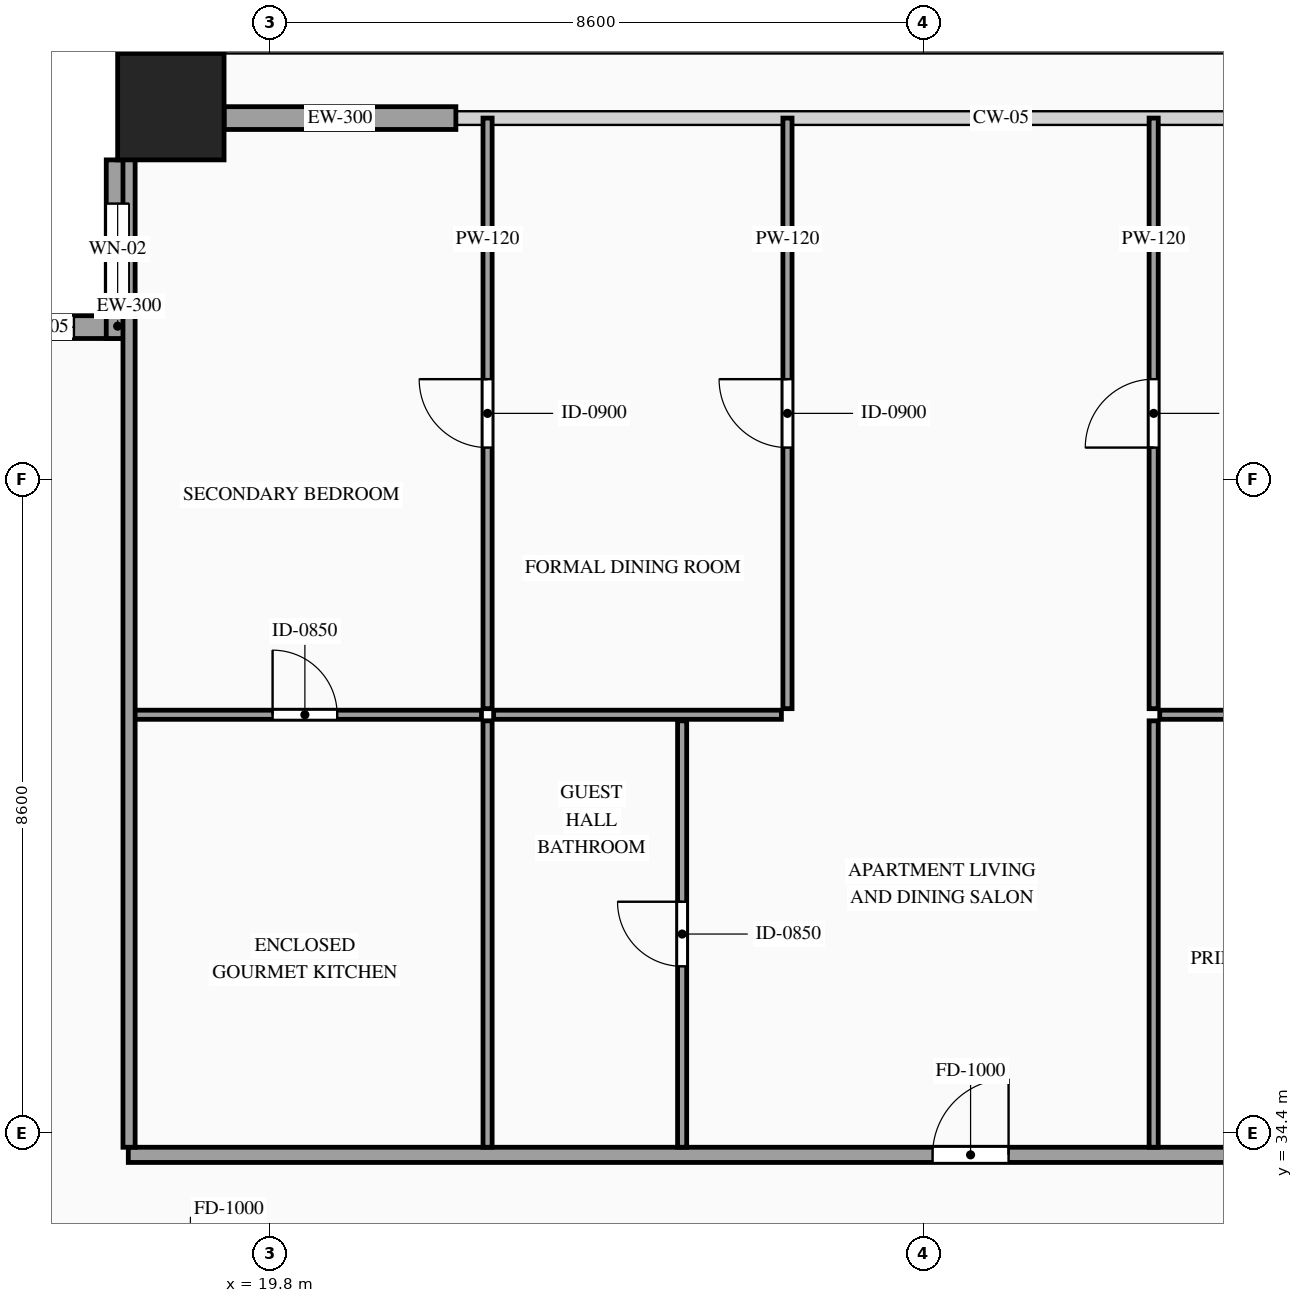
"""IFC4 building model, lengths in metres.
Left out: names, types, materials, properties, quantities, classifications, styles, units other than length and angle.
Written with IfcOpenShell. Run it as: python <this file> out.ifc"""

import sys

from ifc_helpers import new_model, si_unit, direction, frame, frame_2d, origin, origin_2d, place, context, subcontext, project, spatial, rectangle, hollow_rectangle, extrude, source, transform, mapped, element, fill, save


model = new_model("IFC4")
c1 = context("Model", 3, precision=1e-05, world=origin(), true_north=direction((0.0, 1.0)))
c2 = subcontext(c1, "Body", "Model", "MODEL_VIEW")
j1 = project(units=[si_unit("LENGTHUNIT", "METRE"), si_unit("PLANEANGLEUNIT", "RADIAN")], contexts=[c1])
p1 = place(None, origin())
s1 = spatial("IfcSite", under=j1, at=p1, CompositionType="ELEMENT")
p2 = place(p1, origin())
s2 = spatial("IfcBuilding", under=s1, at=p2, CompositionType="ELEMENT")
p3 = place(p2, frame((0.0, 0.0, 212.5)))
s3 = spatial("IfcBuildingStorey", under=s2, at=p3, CompositionType="ELEMENT", Elevation=212.5)
m1 = source(origin(), c2, "Body", "SweptSolid", [
    extrude(hollow_rectangle(XDim=1.4, YDim=1.4, WallThickness=0.06, at=origin_2d()), origin(), (0.0, 0.0, 1.0), 3.5),
])
p4 = place(p3, frame((18.5, 47.9, 0.0), z_axis=(0.0, 0.0, 1.0), x_axis=(1.0, 0.0, 0.0)))
e1 = element("IfcColumn", 1, at=p4, inside=s3, PredefinedType="COLUMN", context=c2, shape_type="MappedRepresentation", body=[
    mapped(m1, transform((0.0, 0.0, 0.0), scale=1.0)),
])
p5 = place(p3, frame((17.95, 45.0, 0.0), z_axis=(0.0, 0.0, 1.0), x_axis=(-1.0, 0.0, 0.0)))
e2 = element("IfcWall", 2, at=p5, inside=s3, PredefinedType="SOLIDWALL", context=c2, shape_type="SweptSolid", body=[
    extrude(rectangle(XDim=2.35, YDim=0.3, at=frame_2d((1.175, 0.0))), origin(), (0.0, 0.0, 1.0), 3.28),
])
p6 = place(p5, frame((0.725, 0.0, 0.85)))
e3 = element("IfcOpeningElement", 3, at=p6, cuts=e2, PredefinedType="OPENING", context=c2, shape_type="SweptSolid", body=[
    extrude(rectangle(XDim=0.9, YDim=1.5, at=frame_2d((0.45, 0.75))), frame((0.0, 0.165, 0.0), z_axis=(0.0, -1.0, 0.0), x_axis=(1.0, 0.0, 0.0)), (0.0, 0.0, 1.0), 0.33),
])
p7 = place(p3, frame((17.8, 47.2, 0.0), z_axis=(0.0, 0.0, 1.0), x_axis=(0.0, -1.0, 0.0)))
e4 = element("IfcWall", 4, at=p7, inside=s3, PredefinedType="SOLIDWALL", context=c2, shape_type="SweptSolid", body=[
    extrude(rectangle(XDim=2.35, YDim=0.3, at=frame_2d((1.175, 0.0))), origin(), (0.0, 0.0, 1.0), 3.28),
])
p8 = place(p7, frame((0.575, 0.0, 0.85)))
e5 = element("IfcOpeningElement", 5, at=p8, cuts=e4, PredefinedType="OPENING", context=c2, shape_type="SweptSolid", body=[
    extrude(rectangle(XDim=1.2, YDim=2.1, at=frame_2d((0.6, 1.05))), frame((0.0, 0.165, 0.0), z_axis=(0.0, -1.0, 0.0), x_axis=(1.0, 0.0, 0.0)), (0.0, 0.0, 1.0), 0.33),
])
m2 = source(origin(), c2, "Body", "SweptSolid", [
    extrude(rectangle(XDim=3.05, YDim=0.3, at=frame_2d((1.525, 0.0))), origin(), (0.0, 0.0, 1.0), 2.835),
])
p9 = place(p3, frame((19.2, 47.75, 0.0), z_axis=(0.0, 0.0, 1.0), x_axis=(1.0, 0.0, 0.0)))
e6 = element("IfcWall", 6, at=p9, inside=s3, PredefinedType="SOLIDWALL", context=c2, shape_type="MappedRepresentation", body=[
    mapped(m2, transform((0.0, 0.0, 0.0), scale=1.0)),
])
p10 = place(p3, frame((17.94, 34.11, 0.0), z_axis=(0.0, 0.0, 1.0), x_axis=(1.0, 0.0, 0.0)))
e7 = element("IfcWall", 7, at=p10, inside=s3, PredefinedType="PARTITIONING", context=c2, shape_type="SweptSolid", body=[
    extrude(rectangle(XDim=18.218, YDim=0.2, at=frame_2d((9.109, 0.0))), origin(), (0.0, 0.0, 1.0), 3.28),
])
p11 = place(p10, frame((10.582, 0.0, 0.0)))
e8 = element("IfcOpeningElement", 8, at=p11, cuts=e7, PredefinedType="OPENING", context=c2, shape_type="SweptSolid", body=[
    extrude(rectangle(XDim=1.0, YDim=2.2, at=frame_2d((0.5, 1.1))), frame((0.0, 0.115, 0.0), z_axis=(0.0, -1.0, 0.0), x_axis=(1.0, 0.0, 0.0)), (0.0, 0.0, 1.0), 0.23),
])
p12 = place(p3, frame((17.94, 39.9, 0.0), z_axis=(0.0, 0.0, 1.0), x_axis=(1.0, 0.0, 0.0)))
e9 = element("IfcWall", 9, at=p12, inside=s3, PredefinedType="PARTITIONING", context=c2, shape_type="SweptSolid", body=[
    extrude(rectangle(XDim=4.647, YDim=0.12, at=frame_2d((2.323, 0.0))), origin(), (0.0, 0.0, 1.0), 3.28),
])
p13 = place(p12, frame((1.898, 0.0, 0.0)))
e10 = element("IfcOpeningElement", 10, at=p13, cuts=e9, PredefinedType="OPENING", context=c2, shape_type="SweptSolid", body=[
    extrude(rectangle(XDim=0.85, YDim=2.1, at=frame_2d((0.425, 1.05))), frame((0.0, 0.075, 0.0), z_axis=(0.0, -1.0, 0.0), x_axis=(1.0, 0.0, 0.0)), (0.0, 0.0, 1.0), 0.15),
])
m3 = source(origin(), c2, "Body", "SweptSolid", [
    extrude(rectangle(XDim=5.61, YDim=0.12, at=frame_2d((2.805, 0.0))), origin(), (0.0, 0.0, 1.0), 3.28),
])
p14 = place(p3, frame((22.667, 34.21, 0.0), z_axis=(0.0, 0.0, 1.0), x_axis=(0.0, 1.0, 0.0)))
e11 = element("IfcWall", 11, at=p14, inside=s3, PredefinedType="PARTITIONING", context=c2, shape_type="MappedRepresentation", body=[
    mapped(m3, transform((0.0, 0.0, 0.0), scale=1.0)),
])
p15 = place(p3, frame((25.227, 34.21, 0.0), z_axis=(0.0, 0.0, 1.0), x_axis=(0.0, 1.0, 0.0)))
e12 = element("IfcWall", 12, at=p15, inside=s3, PredefinedType="PARTITIONING", context=c2, shape_type="SweptSolid", body=[
    extrude(rectangle(XDim=5.61, YDim=0.12, at=frame_2d((2.805, 0.0))), origin(), (0.0, 0.0, 1.0), 3.28),
])
p16 = place(p15, frame((2.38, 0.0, 0.0)))
e13 = element("IfcOpeningElement", 13, at=p16, cuts=e12, PredefinedType="OPENING", context=c2, shape_type="SweptSolid", body=[
    extrude(rectangle(XDim=0.85, YDim=2.1, at=frame_2d((0.425, 1.05))), frame((0.0, 0.075, 0.0), z_axis=(0.0, -1.0, 0.0), x_axis=(1.0, 0.0, 0.0)), (0.0, 0.0, 1.0), 0.15),
])
p17 = place(p3, frame((31.511, 39.9, 0.0), z_axis=(0.0, 0.0, 1.0), x_axis=(1.0, 0.0, 0.0)))
e14 = element("IfcWall", 14, at=p17, inside=s3, PredefinedType="PARTITIONING", context=c2, shape_type="SweptSolid", body=[
    extrude(rectangle(XDim=4.647, YDim=0.12, at=frame_2d((2.323, 0.0))), origin(), (0.0, 0.0, 1.0), 2.875),
])
p18 = place(p17, frame((1.898, 0.0, 0.0)))
e15 = element("IfcOpeningElement", 15, at=p18, cuts=e14, PredefinedType="OPENING", context=c2, shape_type="SweptSolid", body=[
    extrude(rectangle(XDim=0.85, YDim=2.1, at=frame_2d((0.425, 1.05))), frame((0.0, 0.075, 0.0), z_axis=(0.0, -1.0, 0.0), x_axis=(1.0, 0.0, 0.0)), (0.0, 0.0, 1.0), 0.15),
])
p19 = place(p3, frame((31.431, 34.21, 0.0), z_axis=(0.0, 0.0, 1.0), x_axis=(0.0, 1.0, 0.0)))
e16 = element("IfcWall", 16, at=p19, inside=s3, PredefinedType="PARTITIONING", context=c2, shape_type="MappedRepresentation", body=[
    mapped(m3, transform((0.0, 0.0, 0.0), scale=1.0)),
])
p20 = place(p3, frame((22.667, 39.98, 0.0), z_axis=(0.0, 0.0, 1.0), x_axis=(0.0, 1.0, 0.0)))
e17 = element("IfcWall", 17, at=p20, inside=s3, PredefinedType="PARTITIONING", context=c2, shape_type="SweptSolid", body=[
    extrude(rectangle(XDim=7.77, YDim=0.12, at=frame_2d((3.885, 0.0))), origin(), (0.0, 0.0, 1.0), 3.28),
])
p21 = place(p20, frame((3.435, 0.0, 0.0)))
e18 = element("IfcOpeningElement", 18, at=p21, cuts=e17, PredefinedType="OPENING", context=c2, shape_type="SweptSolid", body=[
    extrude(rectangle(XDim=0.9, YDim=2.15, at=frame_2d((0.45, 1.075))), frame((0.0, 0.075, 0.0), z_axis=(0.0, -1.0, 0.0), x_axis=(1.0, 0.0, 0.0)), (0.0, 0.0, 1.0), 0.15),
])
p22 = place(p3, frame((31.431, 39.98, 0.0), z_axis=(0.0, 0.0, 1.0), x_axis=(0.0, 1.0, 0.0)))
e19 = element("IfcWall", 19, at=p22, inside=s3, PredefinedType="PARTITIONING", context=c2, shape_type="SweptSolid", body=[
    extrude(rectangle(XDim=7.77, YDim=0.12, at=frame_2d((3.885, 0.0))), origin(), (0.0, 0.0, 1.0), 3.28),
])
p23 = place(p22, frame((3.435, 0.0, 0.0)))
e20 = element("IfcOpeningElement", 20, at=p23, cuts=e19, PredefinedType="OPENING", context=c2, shape_type="SweptSolid", body=[
    extrude(rectangle(XDim=0.9, YDim=2.15, at=frame_2d((0.45, 1.075))), frame((0.0, 0.075, 0.0), z_axis=(0.0, -1.0, 0.0), x_axis=(1.0, 0.0, 0.0)), (0.0, 0.0, 1.0), 0.15),
])
m4 = source(origin(), c2, "Body", "SweptSolid", [
    extrude(rectangle(XDim=3.786, YDim=0.12, at=frame_2d((1.893, 0.0))), origin(), (0.0, 0.0, 1.0), 2.875),
])
p24 = place(p3, frame((22.747, 39.9, 0.0), z_axis=(0.0, 0.0, 1.0), x_axis=(1.0, 0.0, 0.0)))
e21 = element("IfcWall", 21, at=p24, inside=s3, PredefinedType="PARTITIONING", context=c2, shape_type="MappedRepresentation", body=[
    mapped(m4, transform((0.0, 0.0, 0.0), scale=1.0)),
])
p25 = place(p3, frame((26.613, 39.98, 0.0), z_axis=(0.0, 0.0, 1.0), x_axis=(0.0, 1.0, 0.0)))
e22 = element("IfcWall", 22, at=p25, inside=s3, PredefinedType="PARTITIONING", context=c2, shape_type="SweptSolid", body=[
    extrude(rectangle(XDim=7.77, YDim=0.12, at=frame_2d((3.885, 0.0))), origin(), (0.0, 0.0, 1.0), 3.28),
])
p26 = place(p25, frame((3.435, 0.0, 0.0)))
e23 = element("IfcOpeningElement", 23, at=p26, cuts=e22, PredefinedType="OPENING", context=c2, shape_type="SweptSolid", body=[
    extrude(rectangle(XDim=0.9, YDim=2.15, at=frame_2d((0.45, 1.075))), frame((0.0, 0.075, 0.0), z_axis=(0.0, -1.0, 0.0), x_axis=(1.0, 0.0, 0.0)), (0.0, 0.0, 1.0), 0.15),
])
m5 = source(origin(), c2, "Body", "SweptSolid", [
    extrude(rectangle(XDim=13.39, YDim=0.16, at=frame_2d((6.695, 0.0))), origin(), (0.0, 0.0, 1.0), 3.28),
])
p27 = place(p3, frame((17.95, 34.21, 0.0), z_axis=(0.0, 0.0, 1.0), x_axis=(0.0, 1.0, 0.0)))
e24 = element("IfcWall", 24, at=p27, inside=s3, PredefinedType="PARTITIONING", context=c2, shape_type="MappedRepresentation", body=[
    mapped(m5, transform((0.0, 0.0, 0.0), scale=1.0)),
])
m6 = source(origin(), c2, "Body", "SweptSolid", [
    extrude(rectangle(XDim=0.9, YDim=1.5, at=frame_2d((0.45, 0.75))), frame((0.0, 0.03, 0.0), z_axis=(0.0, -1.0, 0.0), x_axis=(1.0, 0.0, 0.0)), (0.0, 0.0, 1.0), 0.06),
])
p28 = place(p6, origin())
e25 = element("IfcWindow", 25, at=p28, inside=s3, PartitioningType="SINGLE_PANEL", PredefinedType="WINDOW", context=c2, shape_type="MappedRepresentation", body=[
    mapped(m6, transform((0.0, 0.0, 0.0), scale=1.0)),
])
fill(e3, e25)
m7 = source(origin(), c2, "Body", "SweptSolid", [
    extrude(rectangle(XDim=1.2, YDim=2.1, at=frame_2d((0.6, 1.05))), frame((0.0, 0.03, 0.0), z_axis=(0.0, -1.0, 0.0), x_axis=(1.0, 0.0, 0.0)), (0.0, 0.0, 1.0), 0.06),
])
p29 = place(p8, origin())
e26 = element("IfcWindow", 26, at=p29, inside=s3, PartitioningType="SINGLE_PANEL", PredefinedType="WINDOW", context=c2, shape_type="MappedRepresentation", body=[
    mapped(m7, transform((0.0, 0.0, 0.0), scale=1.0)),
])
fill(e5, e26)
m8 = source(origin(), c2, "Body", "SweptSolid", [
    extrude(rectangle(XDim=1.0, YDim=2.2, at=frame_2d((0.5, 1.1))), frame((0.0, 0.025, 0.0), z_axis=(0.0, -1.0, 0.0), x_axis=(1.0, 0.0, 0.0)), (0.0, 0.0, 1.0), 0.05),
])
p30 = place(p11, origin())
e27 = element("IfcDoor", 27, at=p30, inside=s3, OperationType="SINGLE_SWING_RIGHT", PredefinedType="DOOR", context=c2, shape_type="MappedRepresentation", body=[
    mapped(m8, transform((0.0, 0.0, 0.0), scale=1.0)),
])
fill(e8, e27)
m9 = source(origin(), c2, "Body", "SweptSolid", [
    extrude(rectangle(XDim=0.85, YDim=2.1, at=frame_2d((0.425, 1.05))), frame((0.0, 0.025, 0.0), z_axis=(0.0, -1.0, 0.0), x_axis=(1.0, 0.0, 0.0)), (0.0, 0.0, 1.0), 0.05),
])
p31 = place(p13, origin())
e28 = element("IfcDoor", 28, at=p31, inside=s3, OperationType="SINGLE_SWING_LEFT", PredefinedType="DOOR", context=c2, shape_type="MappedRepresentation", body=[
    mapped(m9, transform((0.0, 0.0, 0.0), scale=1.0)),
])
fill(e10, e28)
p32 = place(p16, origin())
e29 = element("IfcDoor", 29, at=p32, inside=s3, OperationType="SINGLE_SWING_RIGHT", PredefinedType="DOOR", context=c2, shape_type="MappedRepresentation", body=[
    mapped(m9, transform((0.0, 0.0, 0.0), scale=1.0)),
])
fill(e13, e29)
m10 = source(origin(), c2, "Body", "SweptSolid", [
    extrude(rectangle(XDim=0.9, YDim=2.15, at=frame_2d((0.45, 1.075))), frame((0.0, 0.025, 0.0), z_axis=(0.0, -1.0, 0.0), x_axis=(1.0, 0.0, 0.0)), (0.0, 0.0, 1.0), 0.05),
])
p33 = place(p21, origin())
e30 = element("IfcDoor", 30, at=p33, inside=s3, OperationType="SINGLE_SWING_RIGHT", PredefinedType="DOOR", context=c2, shape_type="MappedRepresentation", body=[
    mapped(m10, transform((0.0, 0.0, 0.0), scale=1.0)),
])
fill(e18, e30)
p34 = place(p23, origin())
e31 = element("IfcDoor", 31, at=p34, inside=s3, OperationType="SINGLE_SWING_LEFT", PredefinedType="DOOR", context=c2, shape_type="MappedRepresentation", body=[
    mapped(m10, transform((0.0, 0.0, 0.0), scale=1.0)),
])
fill(e20, e31)
p35 = place(p26, origin())
e32 = element("IfcDoor", 32, at=p35, inside=s3, OperationType="SINGLE_SWING_RIGHT", PredefinedType="DOOR", context=c2, shape_type="MappedRepresentation", body=[
    mapped(m10, transform((0.0, 0.0, 0.0), scale=1.0)),
])
fill(e23, e32)
save(model, sys.argv[1])
